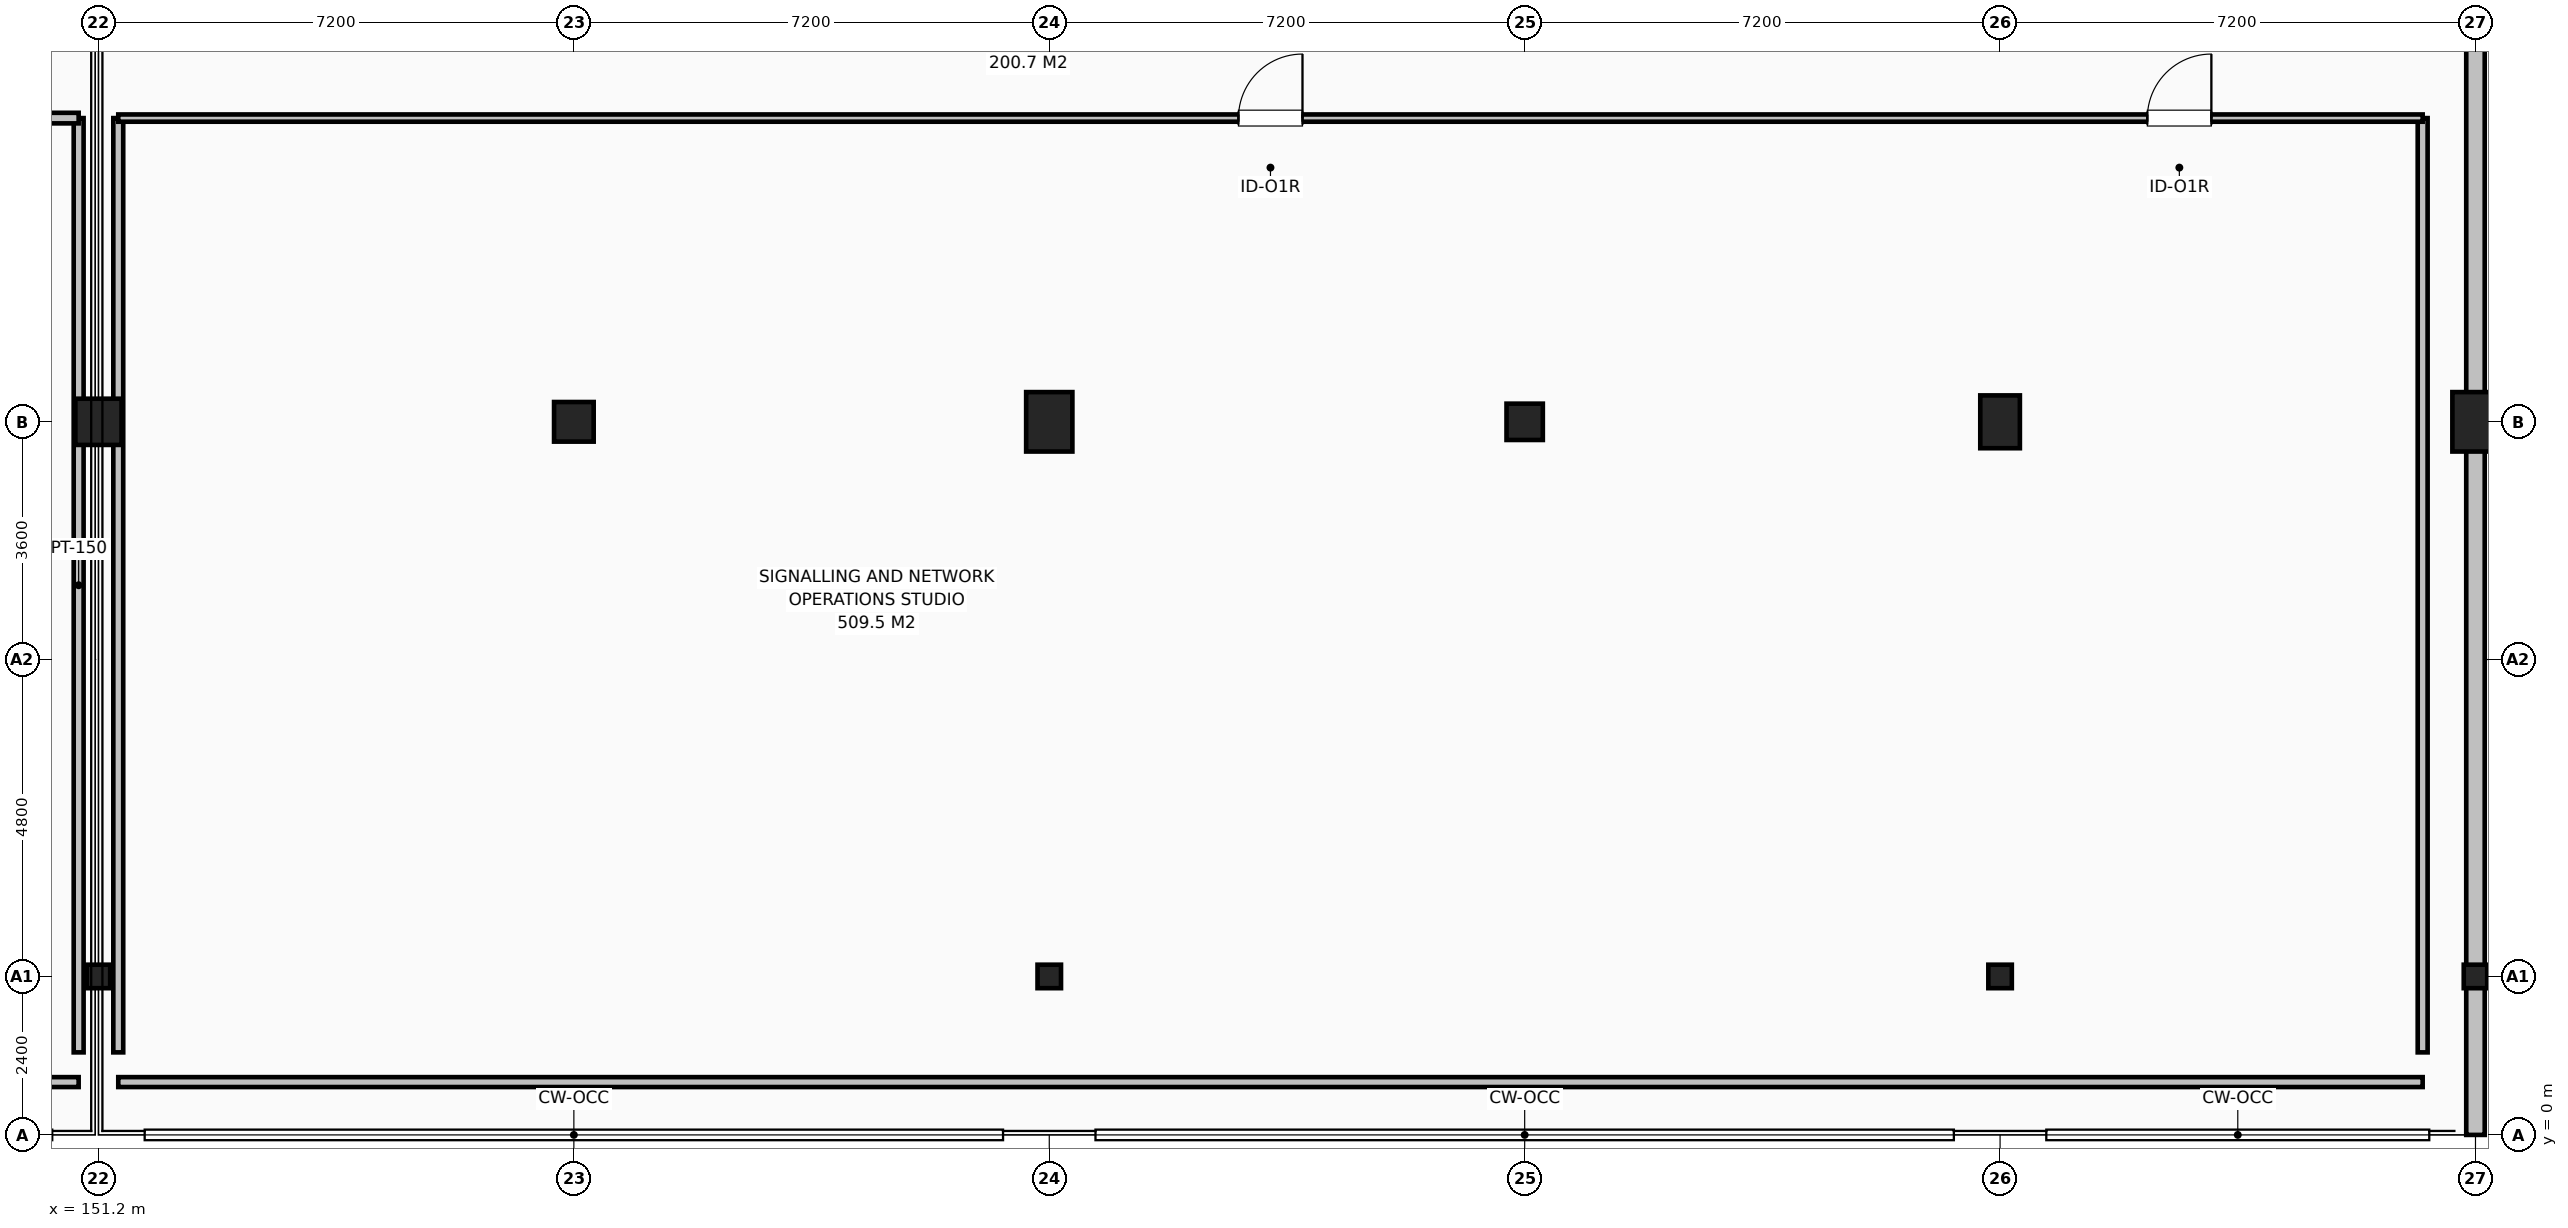
"""IFC4 building model, lengths in metres.
Left out: names, types, materials, properties, quantities, classifications, styles, units other than length and angle.
Written with IfcOpenShell. Run it as: python <this file> out.ifc"""

import sys

from ifc_helpers import new_model, si_unit, direction, frame, frame_2d, origin, origin_2d, place, context, subcontext, project, spatial, rectangle, circle, hollow_circle, extrude, element, fill, save


model = new_model("IFC4")
c1 = context("Model", 3, precision=1e-05, world=origin(), true_north=direction((0.0, 1.0)))
c2 = subcontext(c1, "Body", "Model", "MODEL_VIEW")
j1 = project(units=[si_unit("LENGTHUNIT", "METRE"), si_unit("PLANEANGLEUNIT", "RADIAN")], contexts=[c1])
p1 = place(None, origin())
s1 = spatial("IfcSite", under=j1, at=p1, CompositionType="ELEMENT")
p2 = place(p1, origin())
s2 = spatial("IfcBuilding", under=s1, at=p2, CompositionType="ELEMENT")
p3 = place(p2, frame((0.0, 0.0, 9.0)))
s3 = spatial("IfcBuildingStorey", under=s2, at=p3, CompositionType="ELEMENT", Elevation=9.0)
p4 = place(p3, frame((151.2, 10.8, 0.0), z_axis=(0.0, 0.0, 1.0), x_axis=(1.0, 0.0, 0.0)))
e1 = element("IfcColumn", 1, at=p4, inside=s3, PredefinedType="COLUMN", context=c2, shape_type="SweptSolid", body=[
    extrude(rectangle(XDim=0.7, YDim=0.7, at=origin_2d()), origin(), (0.0, 0.0, 1.0), 4.2),
])
p5 = place(p3, frame((158.4, 10.8, 0.0), z_axis=(0.0, 0.0, 1.0), x_axis=(1.0, 0.0, 0.0)))
e2 = element("IfcColumn", 2, at=p5, inside=s3, PredefinedType="COLUMN", context=c2, shape_type="SweptSolid", body=[
    extrude(circle(Radius=0.3, at=origin_2d()), origin(), (0.0, 0.0, 1.0), 4.2),
])
p6 = place(p3, frame((165.6, 10.8, 0.0), z_axis=(0.0, 0.0, 1.0), x_axis=(1.0, 0.0, 0.0)))
e3 = element("IfcColumn", 3, at=p6, inside=s3, PredefinedType="COLUMN", context=c2, shape_type="SweptSolid", body=[
    extrude(rectangle(XDim=0.7, YDim=0.9, at=origin_2d()), origin(), (0.0, 0.0, 1.0), 4.2),
])
p7 = place(p3, frame((172.8, 10.8, 0.0), z_axis=(0.0, 0.0, 1.0), x_axis=(1.0, 0.0, 0.0)))
e4 = element("IfcColumn", 4, at=p7, inside=s3, PredefinedType="COLUMN", context=c2, shape_type="SweptSolid", body=[
    extrude(rectangle(XDim=0.55, YDim=0.55, at=origin_2d()), origin(), (0.0, 0.0, 1.0), 4.2),
])
p8 = place(p3, frame((180.0, 10.8, 0.0), z_axis=(0.0, 0.0, 1.0), x_axis=(1.0, 0.0, 0.0)))
e5 = element("IfcColumn", 5, at=p8, inside=s3, PredefinedType="COLUMN", context=c2, shape_type="SweptSolid", body=[
    extrude(rectangle(XDim=0.6, YDim=0.8, at=origin_2d()), origin(), (0.0, 0.0, 1.0), 4.2),
])
p9 = place(p3, frame((187.2, 10.8, 0.0), z_axis=(0.0, 0.0, 1.0), x_axis=(1.0, 0.0, 0.0)))
e6 = element("IfcColumn", 6, at=p9, inside=s3, PredefinedType="COLUMN", context=c2, shape_type="SweptSolid", body=[
    extrude(rectangle(XDim=0.7, YDim=0.9, at=origin_2d()), origin(), (0.0, 0.0, 1.0), 4.2),
])
for number, where, z_axis, x_axis in (
    (7, (151.2, 2.4, 0.0), (0.0, 0.0, 1.0), (1.0, 0.0, 0.0)),
    (8, (165.6, 2.4, 0.0), (0.0, 0.0, 1.0), (1.0, 0.0, 0.0)),
    (9, (180.0, 2.4, 0.0), (0.0, 0.0, 1.0), (1.0, 0.0, 0.0)),
    (10, (187.2, 2.4, 0.0), (0.0, 0.0, 1.0), (1.0, 0.0, 0.0)),
):
    element("IfcColumn", number, at=place(p3, frame(where, z_axis=z_axis, x_axis=x_axis)), inside=s3, PredefinedType="COLUMN", context=c2, shape_type="SweptSolid", body=[
        extrude(hollow_circle(Radius=0.178, WallThickness=0.013, at=origin_2d()), origin(), (0.0, 0.0, 1.0), 4.2),
    ])
p10 = place(p3, frame((187.2, 0.0, 0.0), z_axis=(0.0, 0.0, 1.0), x_axis=(0.0, 1.0, 0.0)))
e11 = element("IfcWall", 11, at=p10, inside=s3, PredefinedType="SOLIDWALL", context=c2, shape_type="SweptSolid", body=[
    extrude(rectangle(XDim=86.4, YDim=0.28, at=frame_2d((43.2, 0.0))), origin(), (0.0, 0.0, 1.0), 3.4),
])
p11 = place(p10, frame((38.2, 0.0, 0.78)))
e12 = element("IfcOpeningElement", 12, at=p11, cuts=e11, PredefinedType="OPENING", context=c2, shape_type="SweptSolid", body=[
    extrude(rectangle(XDim=1.25, YDim=1.7, at=frame_2d((0.625, 0.85))), frame((0.0, 0.15, 0.0), z_axis=(0.0, -1.0, 0.0), x_axis=(1.0, 0.0, 0.0)), (0.0, 0.0, 1.0), 0.3),
])
p12 = place(p10, frame((45.4, 0.0, 0.78)))
e13 = element("IfcOpeningElement", 13, at=p12, cuts=e11, PredefinedType="OPENING", context=c2, shape_type="SweptSolid", body=[
    extrude(rectangle(XDim=1.35, YDim=1.75, at=frame_2d((0.675, 0.875))), frame((0.0, 0.15, 0.0), z_axis=(0.0, -1.0, 0.0), x_axis=(1.0, 0.0, 0.0)), (0.0, 0.0, 1.0), 0.3),
])
p13 = place(p10, frame((59.8, 0.0, 0.78)))
e14 = element("IfcOpeningElement", 14, at=p13, cuts=e11, PredefinedType="OPENING", context=c2, shape_type="SweptSolid", body=[
    extrude(rectangle(XDim=1.65, YDim=1.8, at=frame_2d((0.825, 0.9))), frame((0.0, 0.15, 0.0), z_axis=(0.0, -1.0, 0.0), x_axis=(1.0, 0.0, 0.0)), (0.0, 0.0, 1.0), 0.3),
])
p14 = place(p10, frame((67.0, 0.0, 0.78)))
e15 = element("IfcOpeningElement", 15, at=p14, cuts=e11, PredefinedType="OPENING", context=c2, shape_type="SweptSolid", body=[
    extrude(rectangle(XDim=1.95, YDim=1.8, at=frame_2d((0.975, 0.9))), frame((0.0, 0.15, 0.0), z_axis=(0.0, -1.0, 0.0), x_axis=(1.0, 0.0, 0.0)), (0.0, 0.0, 1.0), 0.3),
])
p15 = place(p10, frame((74.2, 0.0, 0.78)))
e16 = element("IfcOpeningElement", 16, at=p15, cuts=e11, PredefinedType="OPENING", context=c2, shape_type="SweptSolid", body=[
    extrude(rectangle(XDim=2.1, YDim=1.8, at=frame_2d((1.05, 0.9))), frame((0.0, 0.15, 0.0), z_axis=(0.0, -1.0, 0.0), x_axis=(1.0, 0.0, 0.0)), (0.0, 0.0, 1.0), 0.3),
])
p16 = place(p3, frame((150.9, 0.8, 0.0), z_axis=(0.0, 0.0, 1.0), x_axis=(-1.0, 0.0, 0.0)))
e17 = element("IfcWall", 17, at=p16, inside=s3, PredefinedType="PARTITIONING", context=c2, shape_type="SweptSolid", body=[
    extrude(rectangle(XDim=21.0, YDim=0.15, at=frame_2d((10.5, 0.0))), origin(), (0.0, 0.0, 1.0), 3.502),
])
p17 = place(p3, frame((150.9, 1.25, 0.0), z_axis=(0.0, 0.0, 1.0), x_axis=(0.0, 1.0, 0.0)))
e18 = element("IfcWall", 18, at=p17, inside=s3, PredefinedType="PARTITIONING", context=c2, shape_type="SweptSolid", body=[
    extrude(rectangle(XDim=14.15, YDim=0.15, at=frame_2d((7.075, 0.0))), origin(), (0.0, 0.0, 1.0), 3.157),
])
p18 = place(p3, frame((129.9, 15.4, 0.0), z_axis=(0.0, 0.0, 1.0), x_axis=(1.0, 0.0, 0.0)))
e19 = element("IfcWall", 19, at=p18, inside=s3, PredefinedType="PARTITIONING", context=c2, shape_type="SweptSolid", body=[
    extrude(rectangle(XDim=21.0, YDim=0.16, at=frame_2d((10.5, 0.0))), origin(), (0.0, 0.0, 1.0), 3.207),
])
p19 = place(p18, frame((10.0, 0.0, 0.0)))
e20 = element("IfcOpeningElement", 20, at=p19, cuts=e19, PredefinedType="OPENING", context=c2, shape_type="SweptSolid", body=[
    extrude(rectangle(XDim=1.0, YDim=2.15, at=frame_2d((0.5, 1.075))), frame((0.0, 0.09, 0.0), z_axis=(0.0, -1.0, 0.0), x_axis=(1.0, 0.0, 0.0)), (0.0, 0.0, 1.0), 0.18),
])
p20 = place(p3, frame((186.4, 0.8, 0.0), z_axis=(0.0, 0.0, 1.0), x_axis=(-1.0, 0.0, 0.0)))
e21 = element("IfcWall", 21, at=p20, inside=s3, PredefinedType="PARTITIONING", context=c2, shape_type="SweptSolid", body=[
    extrude(rectangle(XDim=34.9, YDim=0.15, at=frame_2d((17.45, 0.0))), origin(), (0.0, 0.0, 1.0), 3.502),
])
p21 = place(p3, frame((186.4, 1.25, 0.0), z_axis=(0.0, 0.0, 1.0), x_axis=(0.0, 1.0, 0.0)))
e22 = element("IfcWall", 22, at=p21, inside=s3, PredefinedType="PARTITIONING", context=c2, shape_type="SweptSolid", body=[
    extrude(rectangle(XDim=14.15, YDim=0.15, at=frame_2d((7.075, 0.0))), origin(), (0.0, 0.0, 1.0), 3.052),
])
p22 = place(p3, frame((151.5, 15.4, 0.0), z_axis=(0.0, 0.0, 1.0), x_axis=(0.0, -1.0, 0.0)))
e23 = element("IfcWall", 23, at=p22, inside=s3, PredefinedType="PARTITIONING", context=c2, shape_type="SweptSolid", body=[
    extrude(rectangle(XDim=14.15, YDim=0.15, at=frame_2d((7.075, 0.0))), origin(), (0.0, 0.0, 1.0), 3.157),
])
p23 = place(p3, frame((151.5, 15.4, 0.0), z_axis=(0.0, 0.0, 1.0), x_axis=(1.0, 0.0, 0.0)))
e24 = element("IfcWall", 24, at=p23, inside=s3, PredefinedType="PARTITIONING", context=c2, shape_type="SweptSolid", body=[
    extrude(rectangle(XDim=34.9, YDim=0.11, at=frame_2d((17.45, 0.0))), origin(), (0.0, 0.0, 1.0), 2.957),
])
p24 = place(p23, frame((16.965, 0.0, 0.0)))
e25 = element("IfcOpeningElement", 25, at=p24, cuts=e24, PredefinedType="OPENING", context=c2, shape_type="SweptSolid", body=[
    extrude(rectangle(XDim=0.97, YDim=2.15, at=frame_2d((0.485, 1.075))), frame((0.0, 0.065, 0.0), z_axis=(0.0, -1.0, 0.0), x_axis=(1.0, 0.0, 0.0)), (0.0, 0.0, 1.0), 0.13),
])
p25 = place(p23, frame((30.73, 0.0, 0.0)))
e26 = element("IfcOpeningElement", 26, at=p25, cuts=e24, PredefinedType="OPENING", context=c2, shape_type="SweptSolid", body=[
    extrude(rectangle(XDim=0.97, YDim=2.15, at=frame_2d((0.485, 1.075))), frame((0.0, 0.065, 0.0), z_axis=(0.0, -1.0, 0.0), x_axis=(1.0, 0.0, 0.0)), (0.0, 0.0, 1.0), 0.13),
])
p26 = place(p24, origin())
e27 = element("IfcDoor", 27, at=p26, inside=s3, OperationType="SINGLE_SWING_RIGHT", PredefinedType="DOOR", context=c2, shape_type="SweptSolid", body=[
    extrude(rectangle(XDim=0.97, YDim=2.15, at=frame_2d((0.485, 1.075))), frame((0.0, 0.025, 0.0), z_axis=(0.0, -1.0, 0.0), x_axis=(1.0, 0.0, 0.0)), (0.0, 0.0, 1.0), 0.05),
])
fill(e25, e27)
p27 = place(p25, origin())
e28 = element("IfcDoor", 28, at=p27, inside=s3, OperationType="SINGLE_SWING_RIGHT", PredefinedType="DOOR", context=c2, shape_type="SweptSolid", body=[
    extrude(rectangle(XDim=0.97, YDim=2.15, at=frame_2d((0.485, 1.075))), frame((0.0, 0.025, 0.0), z_axis=(0.0, -1.0, 0.0), x_axis=(1.0, 0.0, 0.0)), (0.0, 0.0, 1.0), 0.05),
])
fill(e26, e28)
save(model, sys.argv[1])
